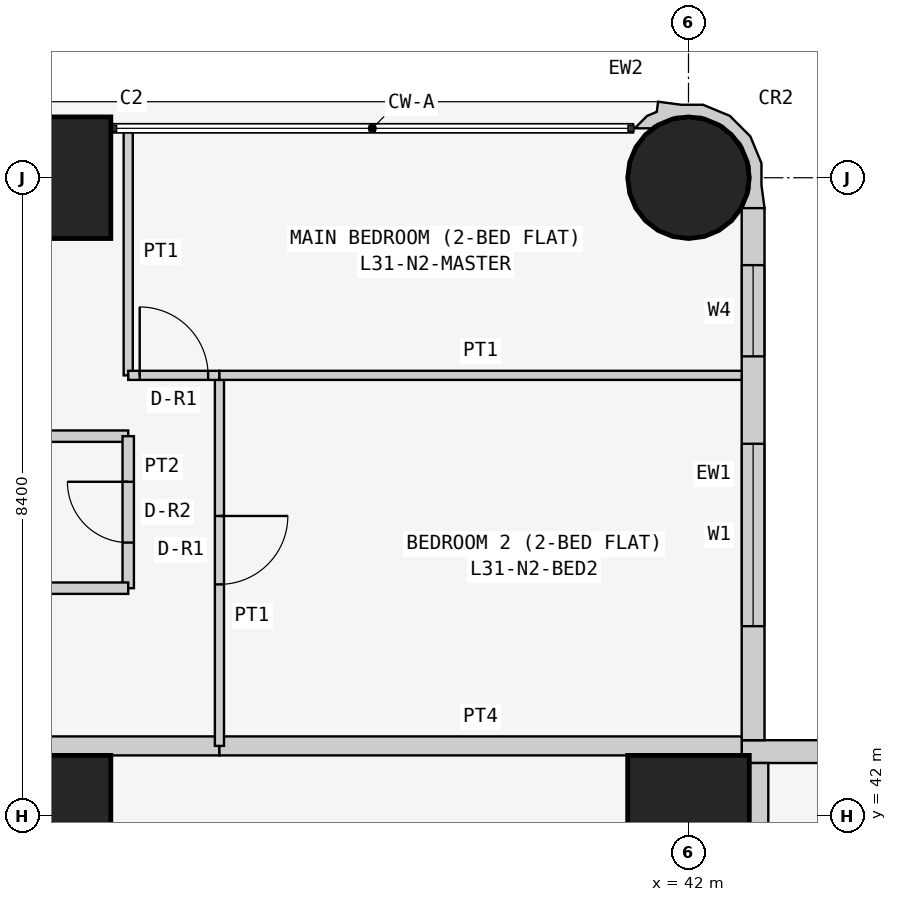
"""IFC4 building model, lengths in metres.
Left out: names, types, materials, properties, quantities, classifications, styles, units other than length and angle.
Written with IfcOpenShell. Run it as: python <this file> out.ifc"""

import sys

from ifc_helpers import new_model, si_unit, direction, frame, frame_2d, origin, origin_2d, place, context, subcontext, project, spatial, polyline, rectangle, circle, outline, extrude, element, fill, save


model = new_model("IFC4")
c1 = context("Model", 3, precision=1e-05, world=origin(), true_north=direction((0.0, 1.0)))
c2 = subcontext(c1, "Body", "Model", "MODEL_VIEW")
j1 = project(units=[si_unit("LENGTHUNIT", "METRE"), si_unit("PLANEANGLEUNIT", "RADIAN")], contexts=[c1])
p1 = place(None, origin())
s1 = spatial("IfcSite", under=j1, at=p1, CompositionType="ELEMENT")
p2 = place(p1, origin())
s2 = spatial("IfcBuilding", under=s1, at=p2, CompositionType="ELEMENT")
p3 = place(p2, frame((0.0, 0.0, 123.3)))
s3 = spatial("IfcBuildingStorey", under=s2, at=p3, CompositionType="ELEMENT", Elevation=123.3)
for number, where, z_axis, x_axis in (
    (1, (33.6, 42.0, 0.0), (0.0, 0.0, 1.0), (1.0, 0.0, 0.0)),
    (2, (33.6, 50.4, 0.0), (0.0, 0.0, 1.0), (1.0, 0.0, 0.0)),
    (3, (42.0, 42.0, 0.0), (0.0, 0.0, 1.0), (1.0, 0.0, 0.0)),
):
    element("IfcColumn", number, at=place(p3, frame(where, z_axis=z_axis, x_axis=x_axis)), inside=s3, PredefinedType="COLUMN", context=c2, shape_type="SweptSolid", body=[
        extrude(rectangle(XDim=1.6, YDim=1.6, at=origin_2d()), origin(), (0.0, 0.0, 1.0), 3.6),
    ])
p4 = place(p3, frame((42.0, 50.4, 0.0), z_axis=(0.0, 0.0, 1.0), x_axis=(1.0, 0.0, 0.0)))
e4 = element("IfcColumn", 4, at=p4, inside=s3, PredefinedType="COLUMN", context=c2, shape_type="SweptSolid", body=[
    extrude(circle(Radius=0.8, at=origin_2d()), origin(), (0.0, 0.0, 1.0), 3.6),
])
p5 = place(p3, frame((58.4, 42.85, 0.0), z_axis=(0.0, 0.0, 1.0), x_axis=(-1.0, 0.0, 0.0)))
e5 = element("IfcWall", 5, at=p5, inside=s3, PredefinedType="SOLIDWALL", context=c2, shape_type="SweptSolid", body=[
    extrude(rectangle(XDim=15.7, YDim=0.3, at=frame_2d((7.85, 0.0))), origin(), (0.0, 0.0, 1.0), 3.45),
])
p6 = place(p5, frame((12.4, 0.0, 0.9)))
e6 = element("IfcOpeningElement", 6, at=p6, cuts=e5, PredefinedType="OPENING", context=c2, shape_type="SweptSolid", body=[
    extrude(rectangle(XDim=1.8, YDim=1.5, at=frame_2d((0.9, 0.75))), frame((0.0, 0.16, 0.0), z_axis=(0.0, -1.0, 0.0), x_axis=(1.0, 0.0, 0.0)), (0.0, 0.0, 1.0), 0.32),
])
p7 = place(p5, frame((9.55, 0.0, 1.5)))
e7 = element("IfcOpeningElement", 7, at=p7, cuts=e5, PredefinedType="OPENING", context=c2, shape_type="SweptSolid", body=[
    extrude(rectangle(XDim=0.9, YDim=0.7, at=frame_2d((0.45, 0.35))), frame((0.0, 0.16, 0.0), z_axis=(0.0, -1.0, 0.0), x_axis=(1.0, 0.0, 0.0)), (0.0, 0.0, 1.0), 0.32),
])
p8 = place(p5, frame((5.1, 0.0, 0.9)))
e8 = element("IfcOpeningElement", 8, at=p8, cuts=e5, PredefinedType="OPENING", context=c2, shape_type="SweptSolid", body=[
    extrude(rectangle(XDim=1.8, YDim=1.5, at=frame_2d((0.9, 0.75))), frame((0.0, 0.16, 0.0), z_axis=(0.0, -1.0, 0.0), x_axis=(1.0, 0.0, 0.0)), (0.0, 0.0, 1.0), 0.32),
])
p9 = place(p5, frame((2.0, 0.0, 0.0)))
e9 = element("IfcOpeningElement", 9, at=p9, cuts=e5, PredefinedType="OPENING", context=c2, shape_type="SweptSolid", body=[
    extrude(rectangle(XDim=0.9, YDim=2.4, at=frame_2d((0.45, 1.2))), frame((0.0, 0.16, 0.0), z_axis=(0.0, -1.0, 0.0), x_axis=(1.0, 0.0, 0.0)), (0.0, 0.0, 1.0), 0.32),
])
p10 = place(p5, frame((0.7, 0.0, 0.9)))
e10 = element("IfcOpeningElement", 10, at=p10, cuts=e5, PredefinedType="OPENING", context=c2, shape_type="SweptSolid", body=[
    extrude(rectangle(XDim=1.2, YDim=1.5, at=frame_2d((0.6, 0.75))), frame((0.0, 0.16, 0.0), z_axis=(0.0, -1.0, 0.0), x_axis=(1.0, 0.0, 0.0)), (0.0, 0.0, 1.0), 0.32),
])
p11 = place(p3, frame((42.85, 43.0, 0.0), z_axis=(0.0, 0.0, 1.0), x_axis=(0.0, 1.0, 0.0)))
e11 = element("IfcWall", 11, at=p11, inside=s3, PredefinedType="SOLIDWALL", context=c2, shape_type="SweptSolid", body=[
    extrude(rectangle(XDim=7.0, YDim=0.3, at=frame_2d((3.5, 0.0))), origin(), (0.0, 0.0, 1.0), 3.45),
])
p12 = place(p11, frame((1.5, 0.0, 0.9)))
e12 = element("IfcOpeningElement", 12, at=p12, cuts=e11, PredefinedType="OPENING", context=c2, shape_type="SweptSolid", body=[
    extrude(rectangle(XDim=2.4, YDim=1.5, at=frame_2d((1.2, 0.75))), frame((0.0, 0.16, 0.0), z_axis=(0.0, -1.0, 0.0), x_axis=(1.0, 0.0, 0.0)), (0.0, 0.0, 1.0), 0.32),
])
p13 = place(p11, frame((5.05, 0.0, 0.9)))
e13 = element("IfcOpeningElement", 13, at=p13, cuts=e11, PredefinedType="OPENING", context=c2, shape_type="SweptSolid", body=[
    extrude(rectangle(XDim=1.2, YDim=1.5, at=frame_2d((0.6, 0.75))), frame((0.0, 0.16, 0.0), z_axis=(0.0, -1.0, 0.0), x_axis=(1.0, 0.0, 0.0)), (0.0, 0.0, 1.0), 0.32),
])
p14 = place(p3, frame((42.817, 50.073, 0.0), z_axis=(0.0, 0.0, 1.0), x_axis=(0.343276641956, 0.93923434088, 0.0)))
e14 = element("IfcWall", 14, at=p14, inside=s3, PredefinedType="SOLIDWALL", context=c2, shape_type="SweptSolid", body=[
    extrude(outline(polyline([(0.266, -0.055), (0.535, 0.044), (0.817, 0.302), (0.978, 0.648), (0.994, 1.03), (0.895, 1.3), (0.828, 1.598), (0.697, 1.569), (0.604, 1.67), (0.394, 1.767), (0.471, 1.556), (0.509, 1.539), (0.724, 1.304), (0.833, 1.005), (0.82, 0.687), (0.686, 0.397), (0.451, 0.182), (0.152, 0.073), (-0.116, 0.084), (-0.128, 0.078), (-0.146, 0.071), (-0.006, -0.197), (0.266, -0.055)])), origin(), (0.0, 0.0, 1.0), 3.45),
])
p15 = place(p3, frame((29.4, 42.925, 0.0), z_axis=(0.0, 0.0, 1.0), x_axis=(1.0, 0.0, 0.0)))
e15 = element("IfcWall", 15, at=p15, inside=s3, PredefinedType="PARTITIONING", context=c2, shape_type="SweptSolid", body=[
    extrude(rectangle(XDim=6.429, YDim=0.25, at=frame_2d((3.215, 0.0))), origin(), (0.0, 0.0, 1.0), 3.45),
])
p16 = place(p15, frame((0.5, 0.0, 0.0)))
e16 = element("IfcOpeningElement", 16, at=p16, cuts=e15, PredefinedType="OPENING", context=c2, shape_type="SweptSolid", body=[
    extrude(rectangle(XDim=1.0, YDim=2.1, at=frame_2d((0.5, 1.05))), frame((0.0, 0.135, 0.0), z_axis=(0.0, -1.0, 0.0), x_axis=(1.0, 0.0, 0.0)), (0.0, 0.0, 1.0), 0.27),
])
for number, where, z_axis, x_axis in (
    (17, (35.829, 42.925, 0.0), (0.0, 0.0, 1.0), (1.0, 0.0, 0.0)),
    (18, (42.925, 42.7, 0.0), (0.0, 0.0, 1.0), (0.0, -1.0, 0.0)),
):
    element("IfcWall", number, at=place(p3, frame(where, z_axis=z_axis, x_axis=x_axis)), inside=s3, PredefinedType="PARTITIONING", context=c2, shape_type="SweptSolid", body=[
        extrude(rectangle(XDim=6.871, YDim=0.25, at=frame_2d((3.436, 0.0))), origin(), (0.0, 0.0, 1.0), 3.45),
    ])
p17 = place(p3, frame((29.4, 47.0, 0.0), z_axis=(0.0, 0.0, 1.0), x_axis=(1.0, 0.0, 0.0)))
e19 = element("IfcWall", 19, at=p17, inside=s3, PredefinedType="PARTITIONING", context=c2, shape_type="SweptSolid", body=[
    extrude(rectangle(XDim=5.229, YDim=0.15, at=frame_2d((2.615, 0.0))), origin(), (0.0, 0.0, 1.0), 3.45),
])
p18 = place(p3, frame((34.629, 47.0, 0.0), z_axis=(0.0, 0.0, 1.0), x_axis=(0.0, -1.0, 0.0)))
e20 = element("IfcWall", 20, at=p18, inside=s3, PredefinedType="PARTITIONING", context=c2, shape_type="SweptSolid", body=[
    extrude(rectangle(XDim=2.0, YDim=0.15, at=frame_2d((1.0, 0.0))), origin(), (0.0, 0.0, 1.0), 3.45),
])
p19 = place(p18, frame((0.6, 0.0, 0.0)))
e21 = element("IfcOpeningElement", 21, at=p19, cuts=e20, PredefinedType="OPENING", context=c2, shape_type="SweptSolid", body=[
    extrude(rectangle(XDim=0.8, YDim=2.1, at=frame_2d((0.4, 1.05))), frame((0.0, 0.085, 0.0), z_axis=(0.0, -1.0, 0.0), x_axis=(1.0, 0.0, 0.0)), (0.0, 0.0, 1.0), 0.17),
])
p20 = place(p3, frame((34.629, 45.0, 0.0), z_axis=(0.0, 0.0, 1.0), x_axis=(-1.0, 0.0, 0.0)))
e22 = element("IfcWall", 22, at=p20, inside=s3, PredefinedType="PARTITIONING", context=c2, shape_type="SweptSolid", body=[
    extrude(rectangle(XDim=5.229, YDim=0.15, at=frame_2d((2.615, 0.0))), origin(), (0.0, 0.0, 1.0), 3.45),
])
p21 = place(p3, frame((35.829, 47.8, 0.0), z_axis=(0.0, 0.0, 1.0), x_axis=(0.0, -1.0, 0.0)))
e23 = element("IfcWall", 23, at=p21, inside=s3, PredefinedType="PARTITIONING", context=c2, shape_type="SweptSolid", body=[
    extrude(rectangle(XDim=4.875, YDim=0.12, at=frame_2d((2.438, 0.0))), origin(), (0.0, 0.0, 1.0), 3.45),
])
p22 = place(p21, frame((1.85, 0.0, 0.0)))
e24 = element("IfcOpeningElement", 24, at=p22, cuts=e23, PredefinedType="OPENING", context=c2, shape_type="SweptSolid", body=[
    extrude(rectangle(XDim=0.9, YDim=2.1, at=frame_2d((0.45, 1.05))), frame((0.0, 0.07, 0.0), z_axis=(0.0, -1.0, 0.0), x_axis=(1.0, 0.0, 0.0)), (0.0, 0.0, 1.0), 0.14),
])
p23 = place(p3, frame((34.629, 51.05, 0.0), z_axis=(0.0, 0.0, 1.0), x_axis=(0.0, -1.0, 0.0)))
e25 = element("IfcWall", 25, at=p23, inside=s3, PredefinedType="PARTITIONING", context=c2, shape_type="SweptSolid", body=[
    extrude(rectangle(XDim=3.25, YDim=0.12, at=frame_2d((1.625, 0.0))), origin(), (0.0, 0.0, 1.0), 3.45),
])
p24 = place(p3, frame((34.629, 47.8, 0.0), z_axis=(0.0, 0.0, 1.0), x_axis=(1.0, 0.0, 0.0)))
e26 = element("IfcWall", 26, at=p24, inside=s3, PredefinedType="PARTITIONING", context=c2, shape_type="SweptSolid", body=[
    extrude(rectangle(XDim=1.2, YDim=0.12, at=frame_2d((0.6, 0.0))), origin(), (0.0, 0.0, 1.0), 3.45),
])
p25 = place(p24, frame((0.151, 0.0, 0.0)))
e27 = element("IfcOpeningElement", 27, at=p25, cuts=e26, PredefinedType="OPENING", context=c2, shape_type="SweptSolid", body=[
    extrude(rectangle(XDim=0.9, YDim=2.1, at=frame_2d((0.45, 1.05))), frame((0.0, 0.07, 0.0), z_axis=(0.0, -1.0, 0.0), x_axis=(1.0, 0.0, 0.0)), (0.0, 0.0, 1.0), 0.14),
])
p26 = place(p3, frame((35.829, 47.8, 0.0), z_axis=(0.0, 0.0, 1.0), x_axis=(1.0, 0.0, 0.0)))
e28 = element("IfcWall", 28, at=p26, inside=s3, PredefinedType="PARTITIONING", context=c2, shape_type="SweptSolid", body=[
    extrude(rectangle(XDim=6.871, YDim=0.12, at=frame_2d((3.436, 0.0))), origin(), (0.0, 0.0, 1.0), 3.45),
])
p27 = place(p12, origin())
e29 = element("IfcWindow", 29, at=p27, inside=s3, PartitioningType="SINGLE_PANEL", PredefinedType="WINDOW", context=c2, shape_type="SweptSolid", body=[
    extrude(rectangle(XDim=2.4, YDim=1.5, at=frame_2d((1.2, 0.75))), frame((0.0, 0.03, 0.0), z_axis=(0.0, -1.0, 0.0), x_axis=(1.0, 0.0, 0.0)), (0.0, 0.0, 1.0), 0.06),
])
fill(e12, e29)
p28 = place(p13, origin())
e30 = element("IfcWindow", 30, at=p28, inside=s3, PartitioningType="SINGLE_PANEL", PredefinedType="WINDOW", context=c2, shape_type="SweptSolid", body=[
    extrude(rectangle(XDim=1.2, YDim=1.5, at=frame_2d((0.6, 0.75))), frame((0.0, 0.03, 0.0), z_axis=(0.0, -1.0, 0.0), x_axis=(1.0, 0.0, 0.0)), (0.0, 0.0, 1.0), 0.06),
])
fill(e13, e30)
p29 = place(p19, frame((0.8, 0.0, 0.0), z_axis=(0.0, 0.0, 1.0), x_axis=(-1.0, 0.0, 0.0)))
e31 = element("IfcDoor", 31, at=p29, inside=s3, OperationType="SINGLE_SWING_RIGHT", PredefinedType="DOOR", context=c2, shape_type="SweptSolid", body=[
    extrude(rectangle(XDim=0.8, YDim=2.1, at=frame_2d((0.4, 1.05))), frame((0.0, 0.025, 0.0), z_axis=(0.0, -1.0, 0.0), x_axis=(1.0, 0.0, 0.0)), (0.0, 0.0, 1.0), 0.05),
])
fill(e21, e31)
p30 = place(p22, origin())
e32 = element("IfcDoor", 32, at=p30, inside=s3, OperationType="SINGLE_SWING_LEFT", PredefinedType="DOOR", context=c2, shape_type="SweptSolid", body=[
    extrude(rectangle(XDim=0.9, YDim=2.1, at=frame_2d((0.45, 1.05))), frame((0.0, 0.025, 0.0), z_axis=(0.0, -1.0, 0.0), x_axis=(1.0, 0.0, 0.0)), (0.0, 0.0, 1.0), 0.05),
])
fill(e24, e32)
p31 = place(p25, origin())
e33 = element("IfcDoor", 33, at=p31, inside=s3, OperationType="SINGLE_SWING_LEFT", PredefinedType="DOOR", context=c2, shape_type="SweptSolid", body=[
    extrude(rectangle(XDim=0.9, YDim=2.1, at=frame_2d((0.45, 1.05))), frame((0.0, 0.025, 0.0), z_axis=(0.0, -1.0, 0.0), x_axis=(1.0, 0.0, 0.0)), (0.0, 0.0, 1.0), 0.05),
])
fill(e27, e33)
save(model, sys.argv[1])
